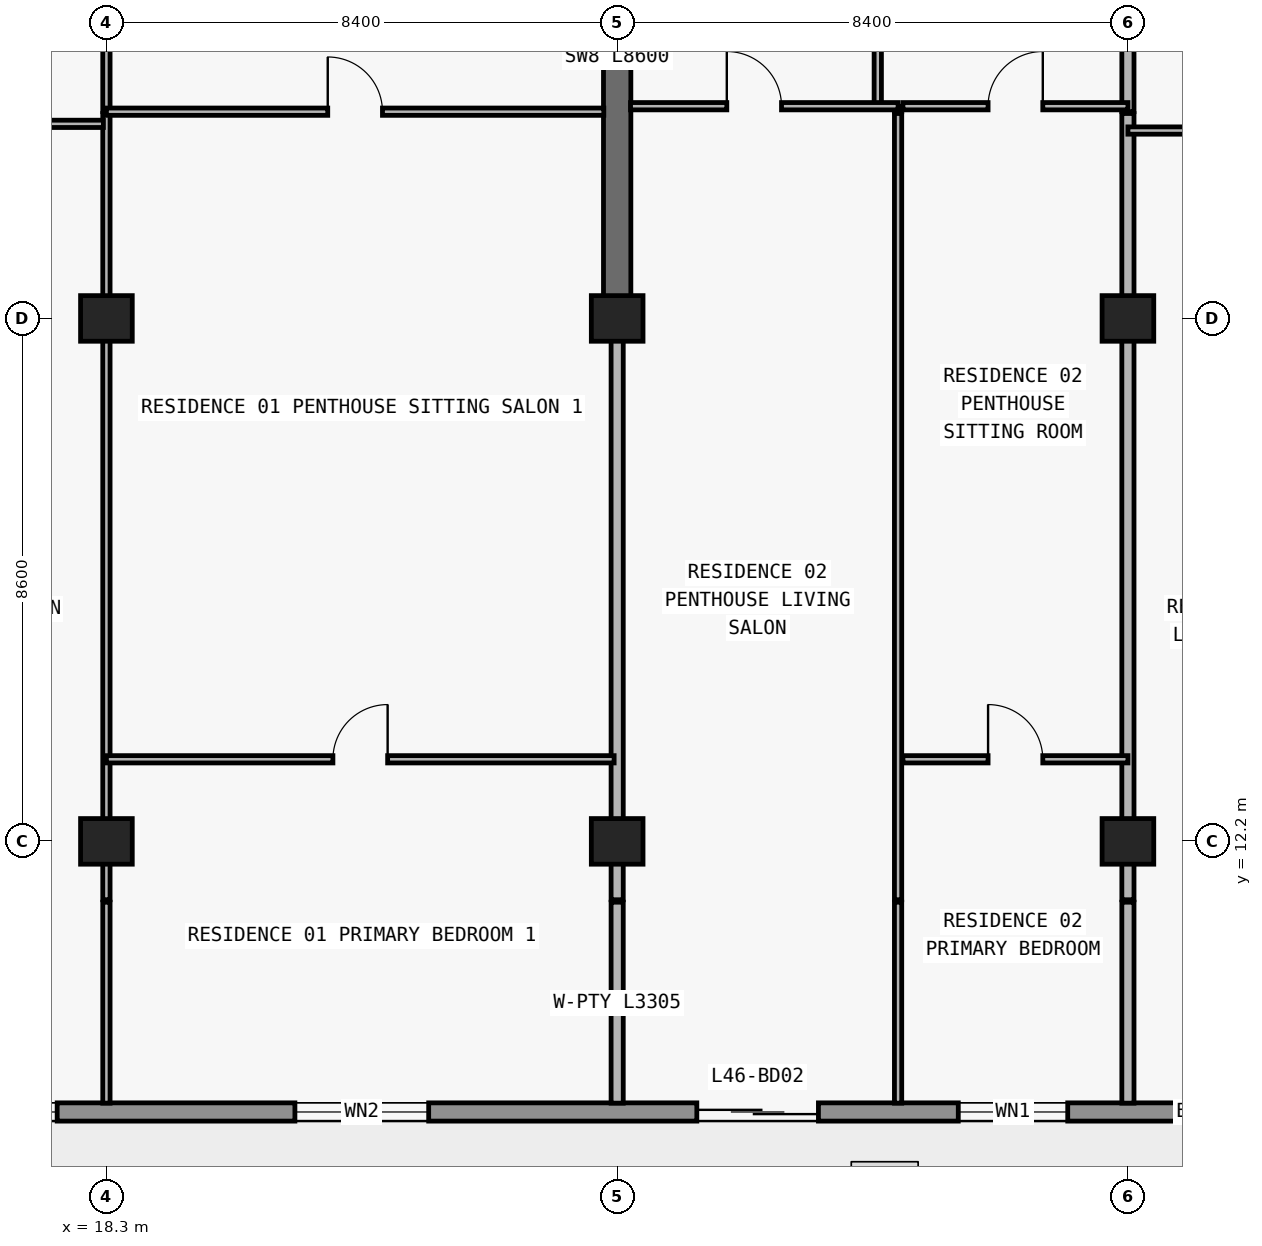
"""IFC4 building model, lengths in metres.
Left out: names, types, materials, properties, quantities, classifications, styles, units other than length and angle.
Written with IfcOpenShell. Run it as: python <this file> out.ifc"""

import sys

from ifc_helpers import new_model, si_unit, direction, frame, frame_2d, origin, origin_2d, place, context, subcontext, project, spatial, rectangle, extrude, element, fill, save


model = new_model("IFC4")
c1 = context("Model", 3, precision=1e-05, world=origin(), true_north=direction((0.0, 1.0)))
c2 = subcontext(c1, "Body", "Model", "MODEL_VIEW")
j1 = project(units=[si_unit("LENGTHUNIT", "METRE"), si_unit("PLANEANGLEUNIT", "RADIAN")], contexts=[c1])
p1 = place(None, origin())
s1 = spatial("IfcSite", under=j1, at=p1, CompositionType="ELEMENT")
p2 = place(p1, origin())
s2 = spatial("IfcBuilding", under=s1, at=p2, CompositionType="ELEMENT")
p3 = place(p2, frame((0.0, 0.0, 167.1)))
s3 = spatial("IfcBuildingStorey", under=s2, at=p3, CompositionType="ELEMENT", Elevation=167.1)
for number, where, z_axis, x_axis in (
    (1, (18.3, 12.2, 0.0), (0.0, 0.0, 1.0), (1.0, 0.0, 0.0)),
    (2, (26.7, 12.2, 0.0), (0.0, 0.0, 1.0), (1.0, 0.0, 0.0)),
    (3, (35.1, 12.2, 0.0), (0.0, 0.0, 1.0), (1.0, 0.0, 0.0)),
    (4, (18.3, 20.8, 0.0), (0.0, 0.0, 1.0), (1.0, 0.0, 0.0)),
    (5, (26.7, 20.8, 0.0), (0.0, 0.0, 1.0), (1.0, 0.0, 0.0)),
    (6, (35.1, 20.8, 0.0), (0.0, 0.0, 1.0), (1.0, 0.0, 0.0)),
):
    element("IfcColumn", number, at=place(p3, frame(where, z_axis=z_axis, x_axis=x_axis)), inside=s3, PredefinedType="COLUMN", context=c2, shape_type="SweptSolid", body=[
        extrude(rectangle(XDim=0.85, YDim=0.75, at=origin_2d()), origin(), (0.0, 0.0, 1.0), 3.05),
    ])
p4 = place(p3, frame((26.7, 20.8, 0.0), z_axis=(0.0, 0.0, 1.0), x_axis=(0.0, 1.0, 0.0)))
e7 = element("IfcWall", 7, at=p4, inside=s3, PredefinedType="SHEAR", context=c2, shape_type="SweptSolid", body=[
    extrude(rectangle(XDim=8.6, YDim=0.45, at=frame_2d((4.3, 0.0))), origin(), (0.0, 0.0, 1.0), 3.05),
])
p5 = place(p3, frame((67.7, 7.75, 0.0), z_axis=(0.0, 0.0, 1.0), x_axis=(-1.0, 0.0, 0.0)))
e8 = element("IfcWall", 8, at=p5, inside=s3, PredefinedType="STANDARD", context=c2, shape_type="SweptSolid", body=[
    extrude(rectangle(XDim=57.6, YDim=0.3, at=frame_2d((28.8, 0.0))), origin(), (0.0, 0.0, 1.0), 3.05),
])
p6 = place(p5, frame((54.69, 0.0, 0.0)))
e9 = element("IfcOpeningElement", 9, at=p6, cuts=e8, PredefinedType="OPENING", context=c2, shape_type="SweptSolid", body=[
    extrude(rectangle(XDim=2.0, YDim=2.3, at=frame_2d((1.0, 1.15))), frame((0.0, 0.16, 0.0), z_axis=(0.0, -1.0, 0.0), x_axis=(1.0, 0.0, 0.0)), (0.0, 0.0, 1.0), 0.32),
])
p7 = place(p5, frame((50.21, 0.0, 0.65)))
e10 = element("IfcOpeningElement", 10, at=p7, cuts=e8, PredefinedType="OPENING", context=c2, shape_type="SweptSolid", body=[
    extrude(rectangle(XDim=2.6, YDim=1.85, at=frame_2d((1.3, 0.925))), frame((0.0, 0.16, 0.0), z_axis=(0.0, -1.0, 0.0), x_axis=(1.0, 0.0, 0.0)), (0.0, 0.0, 1.0), 0.32),
])
p8 = place(p5, frame((44.1, 0.0, 0.85)))
e11 = element("IfcOpeningElement", 11, at=p8, cuts=e8, PredefinedType="OPENING", context=c2, shape_type="SweptSolid", body=[
    extrude(rectangle(XDim=2.2, YDim=1.55, at=frame_2d((1.1, 0.775))), frame((0.0, 0.16, 0.0), z_axis=(0.0, -1.0, 0.0), x_axis=(1.0, 0.0, 0.0)), (0.0, 0.0, 1.0), 0.32),
])
p9 = place(p5, frame((37.69, 0.0, 0.0)))
e12 = element("IfcOpeningElement", 12, at=p9, cuts=e8, PredefinedType="OPENING", context=c2, shape_type="SweptSolid", body=[
    extrude(rectangle(XDim=2.0, YDim=2.3, at=frame_2d((1.0, 1.15))), frame((0.0, 0.16, 0.0), z_axis=(0.0, -1.0, 0.0), x_axis=(1.0, 0.0, 0.0)), (0.0, 0.0, 1.0), 0.32),
])
p10 = place(p5, frame((33.59, 0.0, 0.85)))
e13 = element("IfcOpeningElement", 13, at=p10, cuts=e8, PredefinedType="OPENING", context=c2, shape_type="SweptSolid", body=[
    extrude(rectangle(XDim=1.8, YDim=1.55, at=frame_2d((0.9, 0.775))), frame((0.0, 0.16, 0.0), z_axis=(0.0, -1.0, 0.0), x_axis=(1.0, 0.0, 0.0)), (0.0, 0.0, 1.0), 0.32),
])
p11 = place(p5, frame((25.914, 0.0, 0.85)))
e14 = element("IfcOpeningElement", 14, at=p11, cuts=e8, PredefinedType="OPENING", context=c2, shape_type="SweptSolid", body=[
    extrude(rectangle(XDim=2.2, YDim=1.55, at=frame_2d((1.1, 0.775))), frame((0.0, 0.16, 0.0), z_axis=(0.0, -1.0, 0.0), x_axis=(1.0, 0.0, 0.0)), (0.0, 0.0, 1.0), 0.32),
])
p12 = place(p5, frame((21.69, 0.0, 0.0)))
e15 = element("IfcOpeningElement", 15, at=p12, cuts=e8, PredefinedType="OPENING", context=c2, shape_type="SweptSolid", body=[
    extrude(rectangle(XDim=2.0, YDim=2.3, at=frame_2d((1.0, 1.15))), frame((0.0, 0.16, 0.0), z_axis=(0.0, -1.0, 0.0), x_axis=(1.0, 0.0, 0.0)), (0.0, 0.0, 1.0), 0.32),
])
p13 = place(p5, frame((17.59, 0.0, 0.85)))
e16 = element("IfcOpeningElement", 16, at=p13, cuts=e8, PredefinedType="OPENING", context=c2, shape_type="SweptSolid", body=[
    extrude(rectangle(XDim=1.8, YDim=1.55, at=frame_2d((0.9, 0.775))), frame((0.0, 0.16, 0.0), z_axis=(0.0, -1.0, 0.0), x_axis=(1.0, 0.0, 0.0)), (0.0, 0.0, 1.0), 0.32),
])
p14 = place(p5, frame((13.69, 0.0, 0.0)))
e17 = element("IfcOpeningElement", 17, at=p14, cuts=e8, PredefinedType="OPENING", context=c2, shape_type="SweptSolid", body=[
    extrude(rectangle(XDim=2.0, YDim=2.3, at=frame_2d((1.0, 1.15))), frame((0.0, 0.16, 0.0), z_axis=(0.0, -1.0, 0.0), x_axis=(1.0, 0.0, 0.0)), (0.0, 0.0, 1.0), 0.32),
])
p15 = place(p5, frame((9.01, 0.0, 0.65)))
e18 = element("IfcOpeningElement", 18, at=p15, cuts=e8, PredefinedType="OPENING", context=c2, shape_type="SweptSolid", body=[
    extrude(rectangle(XDim=2.6, YDim=1.85, at=frame_2d((1.3, 0.925))), frame((0.0, 0.16, 0.0), z_axis=(0.0, -1.0, 0.0), x_axis=(1.0, 0.0, 0.0)), (0.0, 0.0, 1.0), 0.32),
])
p16 = place(p5, frame((3.0, 0.0, 0.85)))
e19 = element("IfcOpeningElement", 19, at=p16, cuts=e8, PredefinedType="OPENING", context=c2, shape_type="SweptSolid", body=[
    extrude(rectangle(XDim=2.2, YDim=1.55, at=frame_2d((1.1, 0.775))), frame((0.0, 0.16, 0.0), z_axis=(0.0, -1.0, 0.0), x_axis=(1.0, 0.0, 0.0)), (0.0, 0.0, 1.0), 0.32),
])
p17 = place(p3, frame((18.3, 7.895, 0.0), z_axis=(0.0, 0.0, 1.0), x_axis=(0.0, 1.0, 0.0)))
e20 = element("IfcWall", 20, at=p17, inside=s3, PredefinedType="PARTITIONING", context=c2, shape_type="SweptSolid", body=[
    extrude(rectangle(XDim=3.305, YDim=0.12, at=frame_2d((1.652, 0.0))), origin(), (0.0, 0.0, 1.0), 3.05),
])
p18 = place(p3, frame((18.3, 11.24, 0.0), z_axis=(0.0, 0.0, 1.0), x_axis=(0.0, 1.0, 0.0)))
e21 = element("IfcWall", 21, at=p18, inside=s3, PredefinedType="PARTITIONING", context=c2, shape_type="SweptSolid", body=[
    extrude(rectangle(XDim=12.93, YDim=0.12, at=frame_2d((6.465, 0.0))), origin(), (0.0, 0.0, 1.0), 2.263),
])
p19 = place(p3, frame((18.3, 24.2, 0.0), z_axis=(0.0, 0.0, 1.0), x_axis=(0.0, 1.0, 0.0)))
e22 = element("IfcWall", 22, at=p19, inside=s3, PredefinedType="PARTITIONING", context=c2, shape_type="SweptSolid", body=[
    extrude(rectangle(XDim=4.84, YDim=0.12, at=frame_2d((2.42, 0.0))), origin(), (0.0, 0.0, 1.0), 2.263),
])
p20 = place(p19, frame((1.75, 0.0, 0.0)))
e23 = element("IfcOpeningElement", 23, at=p20, cuts=e22, PredefinedType="OPENING", context=c2, shape_type="SweptSolid", body=[
    extrude(rectangle(XDim=0.9, YDim=2.15, at=frame_2d((0.45, 1.075))), frame((0.0, 0.07, 0.0), z_axis=(0.0, -1.0, 0.0), x_axis=(1.0, 0.0, 0.0)), (0.0, 0.0, 1.0), 0.14),
])
p21 = place(p3, frame((26.7, 7.895, 0.0), z_axis=(0.0, 0.0, 1.0), x_axis=(0.0, 1.0, 0.0)))
e24 = element("IfcWall", 24, at=p21, inside=s3, PredefinedType="PARTITIONING", context=c2, shape_type="SweptSolid", body=[
    extrude(rectangle(XDim=3.305, YDim=0.2, at=frame_2d((1.652, 0.0))), origin(), (0.0, 0.0, 1.0), 3.05),
])
p22 = place(p3, frame((26.7, 11.24, 0.0), z_axis=(0.0, 0.0, 1.0), x_axis=(0.0, 1.0, 0.0)))
e25 = element("IfcWall", 25, at=p22, inside=s3, PredefinedType="PARTITIONING", context=c2, shape_type="SweptSolid", body=[
    extrude(rectangle(XDim=9.555, YDim=0.2, at=frame_2d((4.777, 0.0))), origin(), (0.0, 0.0, 1.0), 2.263),
])
p23 = place(p3, frame((30.986, 24.29, 0.0), z_axis=(0.0, 0.0, 1.0), x_axis=(0.0, 1.0, 0.0)))
e26 = element("IfcWall", 26, at=p23, inside=s3, PredefinedType="PARTITIONING", context=c2, shape_type="SweptSolid", body=[
    extrude(rectangle(XDim=4.75, YDim=0.12, at=frame_2d((2.375, 0.0))), origin(), (0.0, 0.0, 1.0), 3.05),
])
p24 = place(p23, frame((1.925, 0.0, 0.0)))
e27 = element("IfcOpeningElement", 27, at=p24, cuts=e26, PredefinedType="OPENING", context=c2, shape_type="SweptSolid", body=[
    extrude(rectangle(XDim=0.9, YDim=2.15, at=frame_2d((0.45, 1.075))), frame((0.0, 0.07, 0.0), z_axis=(0.0, -1.0, 0.0), x_axis=(1.0, 0.0, 0.0)), (0.0, 0.0, 1.0), 0.14),
])
p25 = place(p3, frame((31.32, 7.895, 0.0), z_axis=(0.0, 0.0, 1.0), x_axis=(0.0, 1.0, 0.0)))
e28 = element("IfcWall", 28, at=p25, inside=s3, PredefinedType="PARTITIONING", context=c2, shape_type="SweptSolid", body=[
    extrude(rectangle(XDim=3.305, YDim=0.12, at=frame_2d((1.652, 0.0))), origin(), (0.0, 0.0, 1.0), 3.05),
])
p26 = place(p3, frame((31.32, 11.24, 0.0), z_axis=(0.0, 0.0, 1.0), x_axis=(0.0, 1.0, 0.0)))
e29 = element("IfcWall", 29, at=p26, inside=s3, PredefinedType="PARTITIONING", context=c2, shape_type="SweptSolid", body=[
    extrude(rectangle(XDim=12.93, YDim=0.12, at=frame_2d((6.465, 0.0))), origin(), (0.0, 0.0, 1.0), 3.05),
])
p27 = place(p3, frame((31.32, 24.2, 0.0), z_axis=(0.0, 0.0, 1.0), x_axis=(0.0, 1.0, 0.0)))
e30 = element("IfcWall", 30, at=p27, inside=s3, PredefinedType="PARTITIONING", context=c2, shape_type="SweptSolid", body=[
    extrude(rectangle(XDim=0.09, YDim=0.12, at=frame_2d((0.045, 0.0))), origin(), (0.0, 0.0, 1.0), 3.05),
])
p28 = place(p3, frame((35.1, 7.895, 0.0), z_axis=(0.0, 0.0, 1.0), x_axis=(0.0, 1.0, 0.0)))
e31 = element("IfcWall", 31, at=p28, inside=s3, PredefinedType="PARTITIONING", context=c2, shape_type="SweptSolid", body=[
    extrude(rectangle(XDim=3.305, YDim=0.2, at=frame_2d((1.652, 0.0))), origin(), (0.0, 0.0, 1.0), 3.05),
])
p29 = place(p3, frame((35.1, 11.24, 0.0), z_axis=(0.0, 0.0, 1.0), x_axis=(0.0, 1.0, 0.0)))
e32 = element("IfcWall", 32, at=p29, inside=s3, PredefinedType="PARTITIONING", context=c2, shape_type="SweptSolid", body=[
    extrude(rectangle(XDim=12.93, YDim=0.2, at=frame_2d((6.465, 0.0))), origin(), (0.0, 0.0, 1.0), 2.263),
])
p30 = place(p3, frame((35.1, 24.2, 0.0), z_axis=(0.0, 0.0, 1.0), x_axis=(0.0, 1.0, 0.0)))
e33 = element("IfcWall", 33, at=p30, inside=s3, PredefinedType="PARTITIONING", context=c2, shape_type="SweptSolid", body=[
    extrude(rectangle(XDim=4.84, YDim=0.2, at=frame_2d((2.42, 0.0))), origin(), (0.0, 0.0, 1.0), 2.263),
])
p31 = place(p3, frame((18.3, 13.55, 0.0), z_axis=(0.0, 0.0, 1.0), x_axis=(1.0, 0.0, 0.0)))
e34 = element("IfcWall", 34, at=p31, inside=s3, PredefinedType="PARTITIONING", context=c2, shape_type="SweptSolid", body=[
    extrude(rectangle(XDim=8.35, YDim=0.12, at=frame_2d((4.175, 0.0))), origin(), (0.0, 0.0, 1.0), 3.05),
])
p32 = place(p31, frame((3.725, 0.0, 0.0)))
e35 = element("IfcOpeningElement", 35, at=p32, cuts=e34, PredefinedType="OPENING", context=c2, shape_type="SweptSolid", body=[
    extrude(rectangle(XDim=0.9, YDim=2.15, at=frame_2d((0.45, 1.075))), frame((0.0, 0.07, 0.0), z_axis=(0.0, -1.0, 0.0), x_axis=(1.0, 0.0, 0.0)), (0.0, 0.0, 1.0), 0.14),
])
p33 = place(p3, frame((31.4, 13.55, 0.0), z_axis=(0.0, 0.0, 1.0), x_axis=(1.0, 0.0, 0.0)))
e36 = element("IfcWall", 36, at=p33, inside=s3, PredefinedType="PARTITIONING", context=c2, shape_type="SweptSolid", body=[
    extrude(rectangle(XDim=3.7, YDim=0.12, at=frame_2d((1.85, 0.0))), origin(), (0.0, 0.0, 1.0), 3.05),
])
p34 = place(p33, frame((1.4, 0.0, 0.0)))
e37 = element("IfcOpeningElement", 37, at=p34, cuts=e36, PredefinedType="OPENING", context=c2, shape_type="SweptSolid", body=[
    extrude(rectangle(XDim=0.9, YDim=2.15, at=frame_2d((0.45, 1.075))), frame((0.0, 0.07, 0.0), z_axis=(0.0, -1.0, 0.0), x_axis=(1.0, 0.0, 0.0)), (0.0, 0.0, 1.0), 0.14),
])
p35 = place(p3, frame((35.1, 23.89, 0.0), z_axis=(0.0, 0.0, 1.0), x_axis=(1.0, 0.0, 0.0)))
e38 = element("IfcWall", 38, at=p35, inside=s3, PredefinedType="PARTITIONING", context=c2, shape_type="SweptSolid", body=[
    extrude(rectangle(XDim=7.6, YDim=0.12, at=frame_2d((3.8, 0.0))), origin(), (0.0, 0.0, 1.0), 3.05),
])
p36 = place(p35, frame((1.336, 0.0, 0.0)))
e39 = element("IfcOpeningElement", 39, at=p36, cuts=e38, PredefinedType="OPENING", context=c2, shape_type="SweptSolid", body=[
    extrude(rectangle(XDim=0.9, YDim=2.15, at=frame_2d((0.45, 1.075))), frame((0.0, 0.07, 0.0), z_axis=(0.0, -1.0, 0.0), x_axis=(1.0, 0.0, 0.0)), (0.0, 0.0, 1.0), 0.14),
])
p37 = place(p35, frame((5.402, 0.0, 0.0)))
e40 = element("IfcOpeningElement", 40, at=p37, cuts=e38, PredefinedType="OPENING", context=c2, shape_type="SweptSolid", body=[
    extrude(rectangle(XDim=0.9, YDim=2.15, at=frame_2d((0.45, 1.075))), frame((0.0, 0.07, 0.0), z_axis=(0.0, -1.0, 0.0), x_axis=(1.0, 0.0, 0.0)), (0.0, 0.0, 1.0), 0.14),
])
p38 = place(p3, frame((10.1, 24.0, 0.0), z_axis=(0.0, 0.0, 1.0), x_axis=(1.0, 0.0, 0.0)))
e41 = element("IfcWall", 41, at=p38, inside=s3, PredefinedType="PARTITIONING", context=c2, shape_type="SweptSolid", body=[
    extrude(rectangle(XDim=8.15, YDim=0.12, at=frame_2d((4.075, 0.0))), origin(), (0.0, 0.0, 1.0), 3.05),
])
p39 = place(p38, frame((3.625, 0.0, 0.0)))
e42 = element("IfcOpeningElement", 42, at=p39, cuts=e41, PredefinedType="OPENING", context=c2, shape_type="SweptSolid", body=[
    extrude(rectangle(XDim=0.9, YDim=2.15, at=frame_2d((0.45, 1.075))), frame((0.0, 0.07, 0.0), z_axis=(0.0, -1.0, 0.0), x_axis=(1.0, 0.0, 0.0)), (0.0, 0.0, 1.0), 0.14),
])
p40 = place(p3, frame((18.3, 24.2, 0.0), z_axis=(0.0, 0.0, 1.0), x_axis=(1.0, 0.0, 0.0)))
e43 = element("IfcWall", 43, at=p40, inside=s3, PredefinedType="PARTITIONING", context=c2, shape_type="SweptSolid", body=[
    extrude(rectangle(XDim=8.18, YDim=0.12, at=frame_2d((4.09, 0.0))), origin(), (0.0, 0.0, 1.0), 3.05),
])
p41 = place(p40, frame((3.64, 0.0, 0.0)))
e44 = element("IfcOpeningElement", 44, at=p41, cuts=e43, PredefinedType="OPENING", context=c2, shape_type="SweptSolid", body=[
    extrude(rectangle(XDim=0.9, YDim=2.15, at=frame_2d((0.45, 1.075))), frame((0.0, 0.07, 0.0), z_axis=(0.0, -1.0, 0.0), x_axis=(1.0, 0.0, 0.0)), (0.0, 0.0, 1.0), 0.14),
])
p42 = place(p3, frame((26.92, 24.29, 0.0), z_axis=(0.0, 0.0, 1.0), x_axis=(1.0, 0.0, 0.0)))
e45 = element("IfcWall", 45, at=p42, inside=s3, PredefinedType="PARTITIONING", context=c2, shape_type="SweptSolid", body=[
    extrude(rectangle(XDim=4.4, YDim=0.12, at=frame_2d((2.2, 0.0))), origin(), (0.0, 0.0, 1.0), 3.05),
])
p43 = place(p42, frame((1.583, 0.0, 0.0)))
e46 = element("IfcOpeningElement", 46, at=p43, cuts=e45, PredefinedType="OPENING", context=c2, shape_type="SweptSolid", body=[
    extrude(rectangle(XDim=0.9, YDim=2.15, at=frame_2d((0.45, 1.075))), frame((0.0, 0.07, 0.0), z_axis=(0.0, -1.0, 0.0), x_axis=(1.0, 0.0, 0.0)), (0.0, 0.0, 1.0), 0.14),
])
p44 = place(p3, frame((31.4, 24.29, 0.0), z_axis=(0.0, 0.0, 1.0), x_axis=(1.0, 0.0, 0.0)))
e47 = element("IfcWall", 47, at=p44, inside=s3, PredefinedType="PARTITIONING", context=c2, shape_type="SweptSolid", body=[
    extrude(rectangle(XDim=3.7, YDim=0.12, at=frame_2d((1.85, 0.0))), origin(), (0.0, 0.0, 1.0), 3.05),
])
p45 = place(p44, frame((1.4, 0.0, 0.0)))
e48 = element("IfcOpeningElement", 48, at=p45, cuts=e47, PredefinedType="OPENING", context=c2, shape_type="SweptSolid", body=[
    extrude(rectangle(XDim=0.9, YDim=2.15, at=frame_2d((0.45, 1.075))), frame((0.0, 0.07, 0.0), z_axis=(0.0, -1.0, 0.0), x_axis=(1.0, 0.0, 0.0)), (0.0, 0.0, 1.0), 0.14),
])
p46 = place(p7, origin())
e49 = element("IfcWindow", 49, at=p46, inside=s3, PartitioningType="SINGLE_PANEL", PredefinedType="WINDOW", context=c2, shape_type="SweptSolid", body=[
    extrude(rectangle(XDim=2.6, YDim=1.85, at=frame_2d((1.3, 0.925))), frame((0.0, 0.03, 0.0), z_axis=(0.0, -1.0, 0.0), x_axis=(1.0, 0.0, 0.0)), (0.0, 0.0, 1.0), 0.06),
])
fill(e10, e49)
p47 = place(p8, origin())
e50 = element("IfcWindow", 50, at=p47, inside=s3, PartitioningType="SINGLE_PANEL", PredefinedType="WINDOW", context=c2, shape_type="SweptSolid", body=[
    extrude(rectangle(XDim=2.2, YDim=1.55, at=frame_2d((1.1, 0.775))), frame((0.0, 0.03, 0.0), z_axis=(0.0, -1.0, 0.0), x_axis=(1.0, 0.0, 0.0)), (0.0, 0.0, 1.0), 0.06),
])
fill(e11, e50)
p48 = place(p9, origin())
e51 = element("IfcDoor", 51, at=p48, inside=s3, OperationType="DOUBLE_DOOR_SLIDING", PredefinedType="DOOR", context=c2, shape_type="SweptSolid", body=[
    extrude(rectangle(XDim=2.0, YDim=2.3, at=frame_2d((1.0, 1.15))), frame((0.0, 0.025, 0.0), z_axis=(0.0, -1.0, 0.0), x_axis=(1.0, 0.0, 0.0)), (0.0, 0.0, 1.0), 0.05),
])
fill(e12, e51)
p49 = place(p10, origin())
e52 = element("IfcWindow", 52, at=p49, inside=s3, PartitioningType="SINGLE_PANEL", PredefinedType="WINDOW", context=c2, shape_type="SweptSolid", body=[
    extrude(rectangle(XDim=1.8, YDim=1.55, at=frame_2d((0.9, 0.775))), frame((0.0, 0.03, 0.0), z_axis=(0.0, -1.0, 0.0), x_axis=(1.0, 0.0, 0.0)), (0.0, 0.0, 1.0), 0.06),
])
fill(e13, e52)
p50 = place(p41, origin())
e53 = element("IfcDoor", 53, at=p50, inside=s3, OperationType="SINGLE_SWING_LEFT", PredefinedType="DOOR", context=c2, shape_type="SweptSolid", body=[
    extrude(rectangle(XDim=0.9, YDim=2.15, at=frame_2d((0.45, 1.075))), frame((0.0, 0.025, 0.0), z_axis=(0.0, -1.0, 0.0), x_axis=(1.0, 0.0, 0.0)), (0.0, 0.0, 1.0), 0.05),
])
fill(e44, e53)
p51 = place(p32, origin())
e54 = element("IfcDoor", 54, at=p51, inside=s3, OperationType="SINGLE_SWING_RIGHT", PredefinedType="DOOR", context=c2, shape_type="SweptSolid", body=[
    extrude(rectangle(XDim=0.9, YDim=2.15, at=frame_2d((0.45, 1.075))), frame((0.0, 0.025, 0.0), z_axis=(0.0, -1.0, 0.0), x_axis=(1.0, 0.0, 0.0)), (0.0, 0.0, 1.0), 0.05),
])
fill(e35, e54)
p52 = place(p43, origin())
e55 = element("IfcDoor", 55, at=p52, inside=s3, OperationType="SINGLE_SWING_LEFT", PredefinedType="DOOR", context=c2, shape_type="SweptSolid", body=[
    extrude(rectangle(XDim=0.9, YDim=2.15, at=frame_2d((0.45, 1.075))), frame((0.0, 0.025, 0.0), z_axis=(0.0, -1.0, 0.0), x_axis=(1.0, 0.0, 0.0)), (0.0, 0.0, 1.0), 0.05),
])
fill(e46, e55)
p53 = place(p45, origin())
e56 = element("IfcDoor", 56, at=p53, inside=s3, OperationType="SINGLE_SWING_RIGHT", PredefinedType="DOOR", context=c2, shape_type="SweptSolid", body=[
    extrude(rectangle(XDim=0.9, YDim=2.15, at=frame_2d((0.45, 1.075))), frame((0.0, 0.025, 0.0), z_axis=(0.0, -1.0, 0.0), x_axis=(1.0, 0.0, 0.0)), (0.0, 0.0, 1.0), 0.05),
])
fill(e48, e56)
p54 = place(p34, origin())
e57 = element("IfcDoor", 57, at=p54, inside=s3, OperationType="SINGLE_SWING_LEFT", PredefinedType="DOOR", context=c2, shape_type="SweptSolid", body=[
    extrude(rectangle(XDim=0.9, YDim=2.15, at=frame_2d((0.45, 1.075))), frame((0.0, 0.025, 0.0), z_axis=(0.0, -1.0, 0.0), x_axis=(1.0, 0.0, 0.0)), (0.0, 0.0, 1.0), 0.05),
])
fill(e37, e57)
save(model, sys.argv[1])
